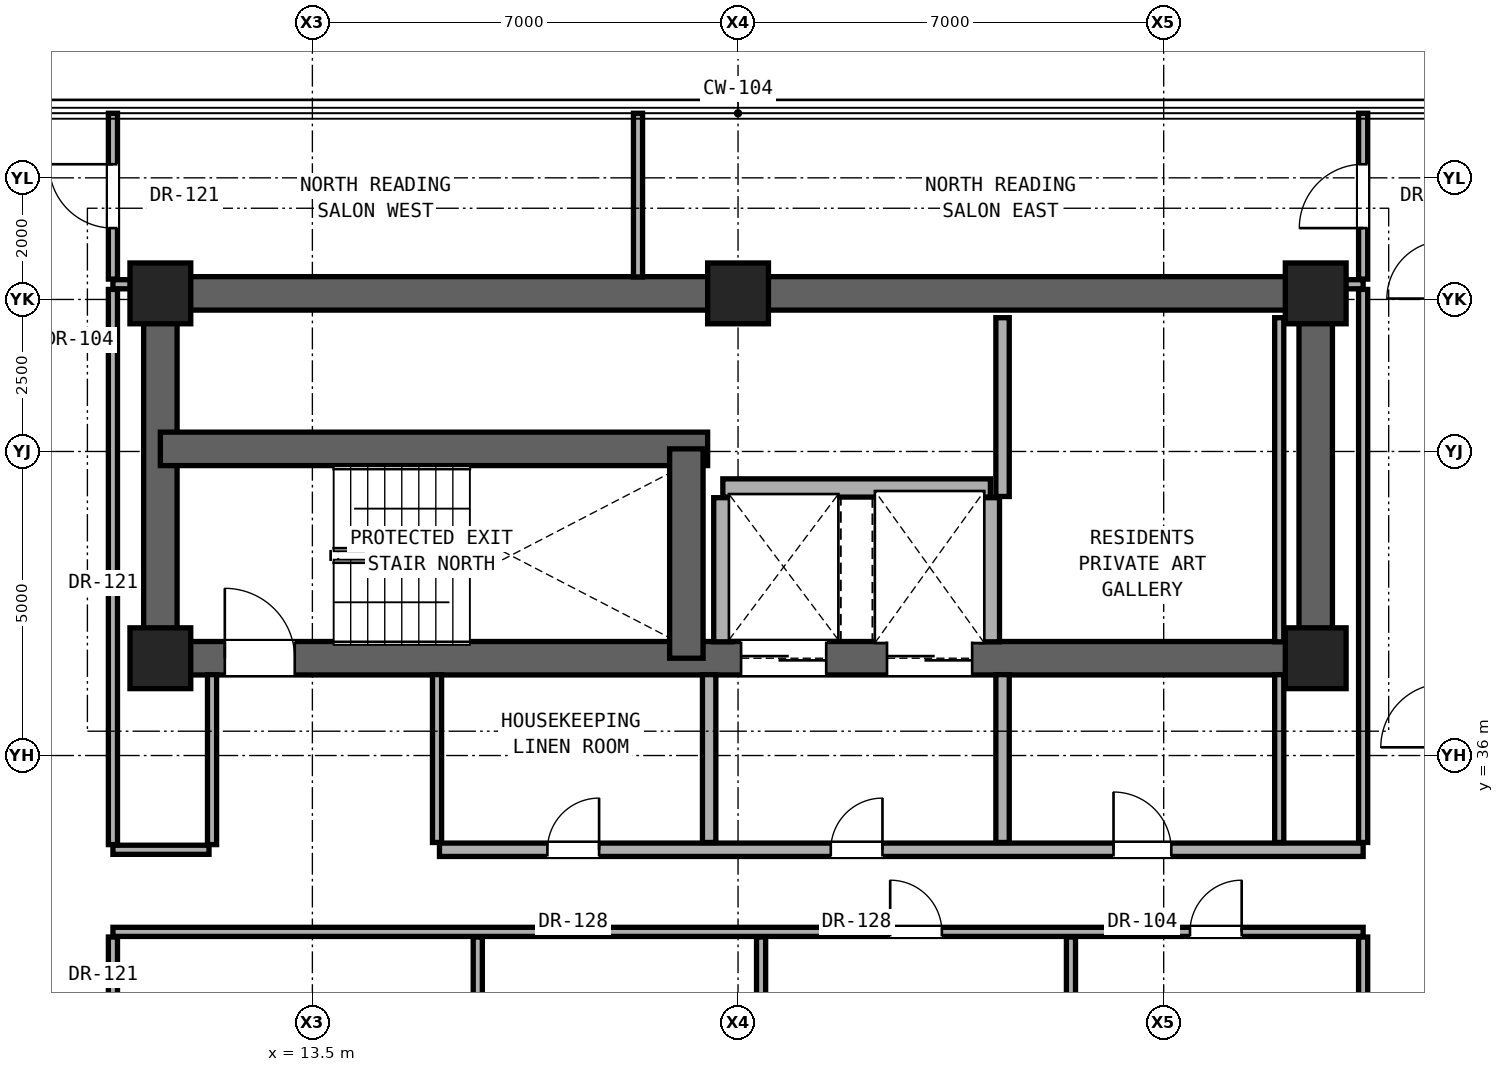
"""IFC4 building model, lengths in metres.
Left out: names, types, materials, properties, quantities, classifications, styles, units other than length and angle.
Written with IfcOpenShell. Run it as: python <this file> out.ifc"""

import sys

from ifc_helpers import new_model, si_unit, direction, frame, frame_2d, origin, origin_2d, place, context, subcontext, project, spatial, rectangle, extrude, element, fill, save


model = new_model("IFC4")
c1 = context("Model", 3, precision=1e-05, world=origin(), true_north=direction((0.0, 1.0)))
c2 = subcontext(c1, "Body", "Model", "MODEL_VIEW")
j1 = project(units=[si_unit("LENGTHUNIT", "METRE"), si_unit("PLANEANGLEUNIT", "RADIAN")], contexts=[c1])
p1 = place(None, origin())
s1 = spatial("IfcSite", under=j1, at=p1, CompositionType="ELEMENT")
p2 = place(p1, origin())
s2 = spatial("IfcBuilding", under=s1, at=p2, CompositionType="ELEMENT")
p3 = place(p2, frame((0.0, 0.0, 167.4)))
s3 = spatial("IfcBuildingStorey", under=s2, at=p3, CompositionType="ELEMENT", Elevation=167.4)
for number, where, z_axis, x_axis in (
    (1, (11.0, 37.6, 0.0), (0.0, 0.0, 1.0), (1.0, 0.0, 0.0)),
    (2, (30.0, 37.6, 0.0), (0.0, 0.0, 1.0), (1.0, 0.0, 0.0)),
    (3, (11.0, 43.6, 0.0), (0.0, 0.0, 1.0), (1.0, 0.0, 0.0)),
    (4, (20.5, 43.6, 0.0), (0.0, 0.0, 1.0), (1.0, 0.0, 0.0)),
    (5, (30.0, 43.6, 0.0), (0.0, 0.0, 1.0), (1.0, 0.0, 0.0)),
):
    element("IfcColumn", number, at=place(p3, frame(where, z_axis=z_axis, x_axis=x_axis)), inside=s3, PredefinedType="COLUMN", context=c2, shape_type="SweptSolid", body=[
        extrude(rectangle(XDim=1.0, YDim=1.0, at=origin_2d()), origin(), (0.0, 0.0, 1.0), 3.25),
    ])
p4 = place(p3, frame((11.0, 43.6, 0.0), z_axis=(0.0, 0.0, 1.0), x_axis=(1.0, 0.0, 0.0)))
e6 = element("IfcWall", 6, at=p4, inside=s3, PredefinedType="SHEAR", context=c2, shape_type="SweptSolid", body=[
    extrude(rectangle(XDim=19.0, YDim=0.55, at=frame_2d((9.5, 0.0))), origin(), (0.0, 0.0, 1.0), 3.05),
])
for number, where, z_axis, x_axis in (
    (7, (11.0, 37.6, 0.0), (0.0, 0.0, 1.0), (0.0, 1.0, 0.0)),
    (8, (30.0, 37.6, 0.0), (0.0, 0.0, 1.0), (0.0, 1.0, 0.0)),
):
    element("IfcWall", number, at=place(p3, frame(where, z_axis=z_axis, x_axis=x_axis)), inside=s3, PredefinedType="SHEAR", context=c2, shape_type="SweptSolid", body=[
        extrude(rectangle(XDim=6.0, YDim=0.55, at=frame_2d((3.0, 0.0))), origin(), (0.0, 0.0, 1.0), 3.05),
    ])
p5 = place(p3, frame((11.0, 37.6, 0.0), z_axis=(0.0, 0.0, 1.0), x_axis=(1.0, 0.0, 0.0)))
e9 = element("IfcWall", 9, at=p5, inside=s3, PredefinedType="SHEAR", context=c2, shape_type="SweptSolid", body=[
    extrude(rectangle(XDim=19.0, YDim=0.55, at=frame_2d((9.5, 0.0))), origin(), (0.0, 0.0, 1.0), 3.05),
])
p6 = place(p5, frame((1.06, 0.0, 0.0)))
e10 = element("IfcOpeningElement", 10, at=p6, cuts=e9, PredefinedType="OPENING", context=c2, shape_type="SweptSolid", body=[
    extrude(rectangle(XDim=1.15, YDim=2.2, at=frame_2d((0.575, 1.1))), frame((0.0, 0.285, 0.0), z_axis=(0.0, -1.0, 0.0), x_axis=(1.0, 0.0, 0.0)), (0.0, 0.0, 1.0), 0.57),
])
p7 = place(p5, frame((9.55, 0.0, 0.0)))
e11 = element("IfcOpeningElement", 11, at=p7, cuts=e9, PredefinedType="OPENING", context=c2, shape_type="SweptSolid", body=[
    extrude(rectangle(XDim=1.4, YDim=2.35, at=frame_2d((0.7, 1.175))), frame((0.0, 0.285, 0.0), z_axis=(0.0, -1.0, 0.0), x_axis=(1.0, 0.0, 0.0)), (0.0, 0.0, 1.0), 0.57),
])
p8 = place(p5, frame((11.95, 0.0, 0.0)))
e12 = element("IfcOpeningElement", 12, at=p8, cuts=e9, PredefinedType="OPENING", context=c2, shape_type="SweptSolid", body=[
    extrude(rectangle(XDim=1.4, YDim=2.35, at=frame_2d((0.7, 1.175))), frame((0.0, 0.285, 0.0), z_axis=(0.0, -1.0, 0.0), x_axis=(1.0, 0.0, 0.0)), (0.0, 0.0, 1.0), 0.57),
])
p9 = place(p3, frame((11.0, 41.043, 0.0), z_axis=(0.0, 0.0, 1.0), x_axis=(1.0, 0.0, 0.0)))
e13 = element("IfcWall", 13, at=p9, inside=s3, PredefinedType="SHEAR", context=c2, shape_type="SweptSolid", body=[
    extrude(rectangle(XDim=9.0, YDim=0.55, at=frame_2d((4.5, 0.0))), origin(), (0.0, 0.0, 1.0), 3.05),
])
p10 = place(p3, frame((19.65, 37.6, 0.0), z_axis=(0.0, 0.0, 1.0), x_axis=(0.0, 1.0, 0.0)))
e14 = element("IfcWall", 14, at=p10, inside=s3, PredefinedType="SHEAR", context=c2, shape_type="SweptSolid", body=[
    extrude(rectangle(XDim=3.443, YDim=0.55, at=frame_2d((1.721, 0.0))), origin(), (0.0, 0.0, 1.0), 3.05),
])
p11 = place(p3, frame((10.22, 33.1, 0.0), z_axis=(0.0, 0.0, 1.0), x_axis=(1.0, 0.0, 0.0)))
e15 = element("IfcWall", 15, at=p11, inside=s3, PredefinedType="PARTITIONING", context=c2, shape_type="SweptSolid", body=[
    extrude(rectangle(XDim=20.56, YDim=0.15, at=frame_2d((10.28, 0.0))), origin(), (0.0, 0.0, 1.0), 2.186),
])
p12 = place(p11, frame((12.782, 0.0, 0.0)))
e16 = element("IfcOpeningElement", 16, at=p12, cuts=e15, PredefinedType="OPENING", context=c2, shape_type="SweptSolid", body=[
    extrude(rectangle(XDim=0.85, YDim=2.01, at=frame_2d((0.425, 1.005))), frame((0.0, 0.085, 0.0), z_axis=(0.0, -1.0, 0.0), x_axis=(1.0, 0.0, 0.0)), (0.0, 0.0, 1.0), 0.17),
])
p13 = place(p11, frame((17.712, 0.0, 0.0)))
e17 = element("IfcOpeningElement", 17, at=p13, cuts=e15, PredefinedType="OPENING", context=c2, shape_type="SweptSolid", body=[
    extrude(rectangle(XDim=0.85, YDim=2.01, at=frame_2d((0.425, 1.005))), frame((0.0, 0.085, 0.0), z_axis=(0.0, -1.0, 0.0), x_axis=(1.0, 0.0, 0.0)), (0.0, 0.0, 1.0), 0.17),
])
p14 = place(p3, frame((10.22, 34.45, 0.0), z_axis=(0.0, 0.0, 1.0), x_axis=(1.0, 0.0, 0.0)))
e18 = element("IfcWall", 18, at=p14, inside=s3, PredefinedType="PARTITIONING", context=c2, shape_type="SweptSolid", body=[
    extrude(rectangle(XDim=1.58, YDim=0.15, at=frame_2d((0.79, 0.0))), origin(), (0.0, 0.0, 1.0), 2.186),
])
p15 = place(p3, frame((15.59, 34.45, 0.0), z_axis=(0.0, 0.0, 1.0), x_axis=(1.0, 0.0, 0.0)))
e19 = element("IfcWall", 19, at=p15, inside=s3, PredefinedType="SOLIDWALL", context=c2, shape_type="SweptSolid", body=[
    extrude(rectangle(XDim=15.19, YDim=0.22, at=frame_2d((7.595, 0.0))), origin(), (0.0, 0.0, 1.0), 2.186),
])
p16 = place(p15, frame((6.435, 0.0, 0.0)))
e20 = element("IfcOpeningElement", 20, at=p16, cuts=e19, PredefinedType="OPENING", context=c2, shape_type="SweptSolid", body=[
    extrude(rectangle(XDim=0.85, YDim=2.01, at=frame_2d((0.425, 1.005))), frame((0.0, 0.12, 0.0), z_axis=(0.0, -1.0, 0.0), x_axis=(1.0, 0.0, 0.0)), (0.0, 0.0, 1.0), 0.24),
])
p17 = place(p15, frame((11.085, 0.0, 0.0)))
e21 = element("IfcOpeningElement", 21, at=p17, cuts=e19, PredefinedType="OPENING", context=c2, shape_type="SweptSolid", body=[
    extrude(rectangle(XDim=0.95, YDim=2.15, at=frame_2d((0.475, 1.075))), frame((0.0, 0.12, 0.0), z_axis=(0.0, -1.0, 0.0), x_axis=(1.0, 0.0, 0.0)), (0.0, 0.0, 1.0), 0.24),
])
p18 = place(p15, frame((1.775, 0.0, 0.0)))
e22 = element("IfcOpeningElement", 22, at=p18, cuts=e19, PredefinedType="OPENING", context=c2, shape_type="SweptSolid", body=[
    extrude(rectangle(XDim=0.85, YDim=2.01, at=frame_2d((0.425, 1.005))), frame((0.0, 0.12, 0.0), z_axis=(0.0, -1.0, 0.0), x_axis=(1.0, 0.0, 0.0)), (0.0, 0.0, 1.0), 0.24),
])
p19 = place(p3, frame((20.25, 40.4, 0.0), z_axis=(0.0, 0.0, 1.0), x_axis=(1.0, 0.0, 0.0)))
e23 = element("IfcWall", 23, at=p19, inside=s3, PredefinedType="SOLIDWALL", context=c2, shape_type="SweptSolid", body=[
    extrude(rectangle(XDim=4.4, YDim=0.3, at=frame_2d((2.2, 0.0))), origin(), (0.0, 0.0, 1.0), 3.05),
])
for number, where, z_axis, x_axis in (
    (24, (10.22, 43.75, 0.0), (0.0, 0.0, 1.0), (1.0, 0.0, 0.0)),
    (25, (30.27, 43.75, 0.0), (0.0, 0.0, 1.0), (1.0, 0.0, 0.0)),
):
    element("IfcWall", number, at=place(p3, frame(where, z_axis=z_axis, x_axis=x_axis)), inside=s3, PredefinedType="PARTITIONING", context=c2, shape_type="SweptSolid", body=[
        extrude(rectangle(XDim=0.51, YDim=0.15, at=frame_2d((0.255, 0.0))), origin(), (0.0, 0.0, 1.0), 3.05),
    ])
p20 = place(p3, frame((10.22, 22.935, 0.0), z_axis=(0.0, 0.0, 1.0), x_axis=(0.0, 1.0, 0.0)))
e26 = element("IfcWall", 26, at=p20, inside=s3, PredefinedType="PARTITIONING", context=c2, shape_type="SweptSolid", body=[
    extrude(rectangle(XDim=10.08, YDim=0.15, at=frame_2d((5.04, 0.0))), origin(), (0.0, 0.0, 1.0), 2.346),
])
p21 = place(p20, frame((4.565, 0.0, 0.0)))
e27 = element("IfcOpeningElement", 27, at=p21, cuts=e26, PredefinedType="OPENING", context=c2, shape_type="SweptSolid", body=[
    extrude(rectangle(XDim=0.95, YDim=2.15, at=frame_2d((0.475, 1.075))), frame((0.0, 0.085, 0.0), z_axis=(0.0, -1.0, 0.0), x_axis=(1.0, 0.0, 0.0)), (0.0, 0.0, 1.0), 0.17),
])
p22 = place(p3, frame((10.22, 34.535, 0.0), z_axis=(0.0, 0.0, 1.0), x_axis=(0.0, 1.0, 0.0)))
e28 = element("IfcWall", 28, at=p22, inside=s3, PredefinedType="PARTITIONING", context=c2, shape_type="SweptSolid", body=[
    extrude(rectangle(XDim=9.13, YDim=0.15, at=frame_2d((4.565, 0.0))), origin(), (0.0, 0.0, 1.0), 2.442),
])
p23 = place(p3, frame((10.22, 43.835, 0.0), z_axis=(0.0, 0.0, 1.0), x_axis=(0.0, 1.0, 0.0)))
e29 = element("IfcWall", 29, at=p23, inside=s3, PredefinedType="PARTITIONING", context=c2, shape_type="SweptSolid", body=[
    extrude(rectangle(XDim=2.727, YDim=0.15, at=frame_2d((1.364, 0.0))), origin(), (0.0, 0.0, 1.0), 3.05),
])
p24 = place(p23, frame((0.838, 0.0, 0.0)))
e30 = element("IfcOpeningElement", 30, at=p24, cuts=e29, PredefinedType="OPENING", context=c2, shape_type="SweptSolid", body=[
    extrude(rectangle(XDim=1.05, YDim=2.2, at=frame_2d((0.525, 1.1))), frame((0.0, 0.085, 0.0), z_axis=(0.0, -1.0, 0.0), x_axis=(1.0, 0.0, 0.0)), (0.0, 0.0, 1.0), 0.17),
])
p25 = place(p3, frame((11.85, 34.535, 0.0), z_axis=(0.0, 0.0, 1.0), x_axis=(0.0, 1.0, 0.0)))
e31 = element("IfcWall", 31, at=p25, inside=s3, PredefinedType="PARTITIONING", context=c2, shape_type="SweptSolid", body=[
    extrude(rectangle(XDim=2.795, YDim=0.15, at=frame_2d((1.397, 0.0))), origin(), (0.0, 0.0, 1.0), 3.05),
])
p26 = place(p3, frame((15.55, 34.57, 0.0), z_axis=(0.0, 0.0, 1.0), x_axis=(0.0, 1.0, 0.0)))
e32 = element("IfcWall", 32, at=p26, inside=s3, PredefinedType="PARTITIONING", context=c2, shape_type="SweptSolid", body=[
    extrude(rectangle(XDim=2.76, YDim=0.15, at=frame_2d((1.38, 0.0))), origin(), (0.0, 0.0, 1.0), 3.05),
])
p27 = place(p3, frame((16.22, 22.935, 0.0), z_axis=(0.0, 0.0, 1.0), x_axis=(0.0, 1.0, 0.0)))
e33 = element("IfcWall", 33, at=p27, inside=s3, PredefinedType="PARTITIONING", context=c2, shape_type="SweptSolid", body=[
    extrude(rectangle(XDim=10.08, YDim=0.15, at=frame_2d((5.04, 0.0))), origin(), (0.0, 0.0, 1.0), 2.186),
])
p28 = place(p3, frame((18.855, 43.87, 0.0), z_axis=(0.0, 0.0, 1.0), x_axis=(0.0, 1.0, 0.0)))
e34 = element("IfcWall", 34, at=p28, inside=s3, PredefinedType="PARTITIONING", context=c2, shape_type="SweptSolid", body=[
    extrude(rectangle(XDim=2.692, YDim=0.15, at=frame_2d((1.346, 0.0))), origin(), (0.0, 0.0, 1.0), 3.05),
])
p29 = place(p3, frame((20.025, 34.57, 0.0), z_axis=(0.0, 0.0, 1.0), x_axis=(0.0, 1.0, 0.0)))
e35 = element("IfcWall", 35, at=p29, inside=s3, PredefinedType="SOLIDWALL", context=c2, shape_type="SweptSolid", body=[
    extrude(rectangle(XDim=2.76, YDim=0.22, at=frame_2d((1.38, 0.0))), origin(), (0.0, 0.0, 1.0), 3.05),
])
p30 = place(p3, frame((20.25, 37.87, 0.0), z_axis=(0.0, 0.0, 1.0), x_axis=(0.0, 1.0, 0.0)))
e36 = element("IfcWall", 36, at=p30, inside=s3, PredefinedType="SOLIDWALL", context=c2, shape_type="SweptSolid", body=[
    extrude(rectangle(XDim=2.37, YDim=0.3, at=frame_2d((1.185, 0.0))), origin(), (0.0, 0.0, 1.0), 3.05),
])
p31 = place(p3, frame((20.879, 19.985, 0.0), z_axis=(0.0, 0.0, 1.0), x_axis=(0.0, 1.0, 0.0)))
e37 = element("IfcWall", 37, at=p31, inside=s3, PredefinedType="PARTITIONING", context=c2, shape_type="SweptSolid", body=[
    extrude(rectangle(XDim=13.03, YDim=0.15, at=frame_2d((6.515, 0.0))), origin(), (0.0, 0.0, 1.0), 2.186),
])
p32 = place(p3, frame((24.65, 37.87, 0.0), z_axis=(0.0, 0.0, 1.0), x_axis=(0.0, 1.0, 0.0)))
e38 = element("IfcWall", 38, at=p32, inside=s3, PredefinedType="SOLIDWALL", context=c2, shape_type="SweptSolid", body=[
    extrude(rectangle(XDim=2.37, YDim=0.3, at=frame_2d((1.185, 0.0))), origin(), (0.0, 0.0, 1.0), 3.05),
])
p33 = place(p3, frame((24.85, 34.57, 0.0), z_axis=(0.0, 0.0, 1.0), x_axis=(0.0, 1.0, 0.0)))
e39 = element("IfcWall", 39, at=p33, inside=s3, PredefinedType="SOLIDWALL", context=c2, shape_type="SweptSolid", body=[
    extrude(rectangle(XDim=2.76, YDim=0.22, at=frame_2d((1.38, 0.0))), origin(), (0.0, 0.0, 1.0), 3.05),
])
p34 = place(p3, frame((24.85, 40.26, 0.0), z_axis=(0.0, 0.0, 1.0), x_axis=(0.0, 1.0, 0.0)))
e40 = element("IfcWall", 40, at=p34, inside=s3, PredefinedType="SOLIDWALL", context=c2, shape_type="SweptSolid", body=[
    extrude(rectangle(XDim=2.94, YDim=0.22, at=frame_2d((1.47, 0.0))), origin(), (0.0, 0.0, 1.0), 3.05),
])
p35 = place(p3, frame((25.975, 19.985, 0.0), z_axis=(0.0, 0.0, 1.0), x_axis=(0.0, 1.0, 0.0)))
e41 = element("IfcWall", 41, at=p35, inside=s3, PredefinedType="PARTITIONING", context=c2, shape_type="SweptSolid", body=[
    extrude(rectangle(XDim=13.03, YDim=0.15, at=frame_2d((6.515, 0.0))), origin(), (0.0, 0.0, 1.0), 2.186),
])
p36 = place(p3, frame((29.4, 34.57, 0.0), z_axis=(0.0, 0.0, 1.0), x_axis=(0.0, 1.0, 0.0)))
e42 = element("IfcWall", 42, at=p36, inside=s3, PredefinedType="PARTITIONING", context=c2, shape_type="SweptSolid", body=[
    extrude(rectangle(XDim=2.76, YDim=0.15, at=frame_2d((1.38, 0.0))), origin(), (0.0, 0.0, 1.0), 3.05),
])
p37 = place(p3, frame((29.4, 37.87, 0.0), z_axis=(0.0, 0.0, 1.0), x_axis=(0.0, 1.0, 0.0)))
e43 = element("IfcWall", 43, at=p37, inside=s3, PredefinedType="PARTITIONING", context=c2, shape_type="SweptSolid", body=[
    extrude(rectangle(XDim=5.33, YDim=0.15, at=frame_2d((2.665, 0.0))), origin(), (0.0, 0.0, 1.0), 3.05),
])
p38 = place(p3, frame((30.78, 19.985, 0.0), z_axis=(0.0, 0.0, 1.0), x_axis=(0.0, 1.0, 0.0)))
e44 = element("IfcWall", 44, at=p38, inside=s3, PredefinedType="PARTITIONING", context=c2, shape_type="SweptSolid", body=[
    extrude(rectangle(XDim=13.03, YDim=0.15, at=frame_2d((6.515, 0.0))), origin(), (0.0, 0.0, 1.0), 2.346),
])
p39 = place(p3, frame((30.78, 34.57, 0.0), z_axis=(0.0, 0.0, 1.0), x_axis=(0.0, 1.0, 0.0)))
e45 = element("IfcWall", 45, at=p39, inside=s3, PredefinedType="PARTITIONING", context=c2, shape_type="SweptSolid", body=[
    extrude(rectangle(XDim=9.095, YDim=0.15, at=frame_2d((4.547, 0.0))), origin(), (0.0, 0.0, 1.0), 2.442),
])
p40 = place(p3, frame((30.78, 43.835, 0.0), z_axis=(0.0, 0.0, 1.0), x_axis=(0.0, 1.0, 0.0)))
e46 = element("IfcWall", 46, at=p40, inside=s3, PredefinedType="PARTITIONING", context=c2, shape_type="SweptSolid", body=[
    extrude(rectangle(XDim=2.727, YDim=0.15, at=frame_2d((1.364, 0.0))), origin(), (0.0, 0.0, 1.0), 3.05),
])
p41 = place(p40, frame((0.838, 0.0, 0.0)))
e47 = element("IfcOpeningElement", 47, at=p41, cuts=e46, PredefinedType="OPENING", context=c2, shape_type="SweptSolid", body=[
    extrude(rectangle(XDim=1.05, YDim=2.2, at=frame_2d((0.525, 1.1))), frame((0.0, 0.085, 0.0), z_axis=(0.0, -1.0, 0.0), x_axis=(1.0, 0.0, 0.0)), (0.0, 0.0, 1.0), 0.17),
])
p42 = place(p6, origin())
e48 = element("IfcDoor", 48, at=p42, inside=s3, OperationType="SINGLE_SWING_LEFT", PredefinedType="DOOR", context=c2, shape_type="SweptSolid", body=[
    extrude(rectangle(XDim=1.15, YDim=2.2, at=frame_2d((0.575, 1.1))), frame((0.0, 0.025, 0.0), z_axis=(0.0, -1.0, 0.0), x_axis=(1.0, 0.0, 0.0)), (0.0, 0.0, 1.0), 0.05),
])
fill(e10, e48)
p43 = place(p16, origin())
e49 = element("IfcDoor", 49, at=p43, inside=s3, OperationType="SINGLE_SWING_RIGHT", PredefinedType="DOOR", context=c2, shape_type="SweptSolid", body=[
    extrude(rectangle(XDim=0.85, YDim=2.01, at=frame_2d((0.425, 1.005))), frame((0.0, 0.025, 0.0), z_axis=(0.0, -1.0, 0.0), x_axis=(1.0, 0.0, 0.0)), (0.0, 0.0, 1.0), 0.05),
])
fill(e20, e49)
p44 = place(p17, origin())
e50 = element("IfcDoor", 50, at=p44, inside=s3, OperationType="SINGLE_SWING_LEFT", PredefinedType="DOOR", context=c2, shape_type="SweptSolid", body=[
    extrude(rectangle(XDim=0.95, YDim=2.15, at=frame_2d((0.475, 1.075))), frame((0.0, 0.025, 0.0), z_axis=(0.0, -1.0, 0.0), x_axis=(1.0, 0.0, 0.0)), (0.0, 0.0, 1.0), 0.05),
])
fill(e21, e50)
p45 = place(p18, origin())
e51 = element("IfcDoor", 51, at=p45, inside=s3, OperationType="SINGLE_SWING_RIGHT", PredefinedType="DOOR", context=c2, shape_type="SweptSolid", body=[
    extrude(rectangle(XDim=0.85, YDim=2.01, at=frame_2d((0.425, 1.005))), frame((0.0, 0.025, 0.0), z_axis=(0.0, -1.0, 0.0), x_axis=(1.0, 0.0, 0.0)), (0.0, 0.0, 1.0), 0.05),
])
fill(e22, e51)
p46 = place(p12, origin())
e52 = element("IfcDoor", 52, at=p46, inside=s3, OperationType="SINGLE_SWING_LEFT", PredefinedType="DOOR", context=c2, shape_type="SweptSolid", body=[
    extrude(rectangle(XDim=0.85, YDim=2.01, at=frame_2d((0.425, 1.005))), frame((0.0, 0.025, 0.0), z_axis=(0.0, -1.0, 0.0), x_axis=(1.0, 0.0, 0.0)), (0.0, 0.0, 1.0), 0.05),
])
fill(e16, e52)
p47 = place(p13, origin())
e53 = element("IfcDoor", 53, at=p47, inside=s3, OperationType="SINGLE_SWING_RIGHT", PredefinedType="DOOR", context=c2, shape_type="SweptSolid", body=[
    extrude(rectangle(XDim=0.85, YDim=2.01, at=frame_2d((0.425, 1.005))), frame((0.0, 0.025, 0.0), z_axis=(0.0, -1.0, 0.0), x_axis=(1.0, 0.0, 0.0)), (0.0, 0.0, 1.0), 0.05),
])
fill(e17, e53)
p48 = place(p24, origin())
e54 = element("IfcDoor", 54, at=p48, inside=s3, OperationType="SINGLE_SWING_RIGHT", PredefinedType="DOOR", context=c2, shape_type="SweptSolid", body=[
    extrude(rectangle(XDim=1.05, YDim=2.2, at=frame_2d((0.525, 1.1))), frame((0.0, 0.025, 0.0), z_axis=(0.0, -1.0, 0.0), x_axis=(1.0, 0.0, 0.0)), (0.0, 0.0, 1.0), 0.05),
])
fill(e30, e54)
p49 = place(p41, origin())
e55 = element("IfcDoor", 55, at=p49, inside=s3, OperationType="SINGLE_SWING_LEFT", PredefinedType="DOOR", context=c2, shape_type="SweptSolid", body=[
    extrude(rectangle(XDim=1.05, YDim=2.2, at=frame_2d((0.525, 1.1))), frame((0.0, 0.025, 0.0), z_axis=(0.0, -1.0, 0.0), x_axis=(1.0, 0.0, 0.0)), (0.0, 0.0, 1.0), 0.05),
])
fill(e47, e55)
p50 = place(p7, origin())
e56 = element("IfcDoor", 56, at=p50, inside=s3, OperationType="DOUBLE_DOOR_SLIDING", PredefinedType="DOOR", context=c2, shape_type="SweptSolid", body=[
    extrude(rectangle(XDim=1.4, YDim=2.35, at=frame_2d((0.7, 1.175))), frame((0.0, 0.025, 0.0), z_axis=(0.0, -1.0, 0.0), x_axis=(1.0, 0.0, 0.0)), (0.0, 0.0, 1.0), 0.05),
])
fill(e11, e56)
p51 = place(p8, origin())
e57 = element("IfcDoor", 57, at=p51, inside=s3, OperationType="DOUBLE_DOOR_SLIDING", PredefinedType="DOOR", context=c2, shape_type="SweptSolid", body=[
    extrude(rectangle(XDim=1.4, YDim=2.35, at=frame_2d((0.7, 1.175))), frame((0.0, 0.025, 0.0), z_axis=(0.0, -1.0, 0.0), x_axis=(1.0, 0.0, 0.0)), (0.0, 0.0, 1.0), 0.05),
])
fill(e12, e57)
save(model, sys.argv[1])
